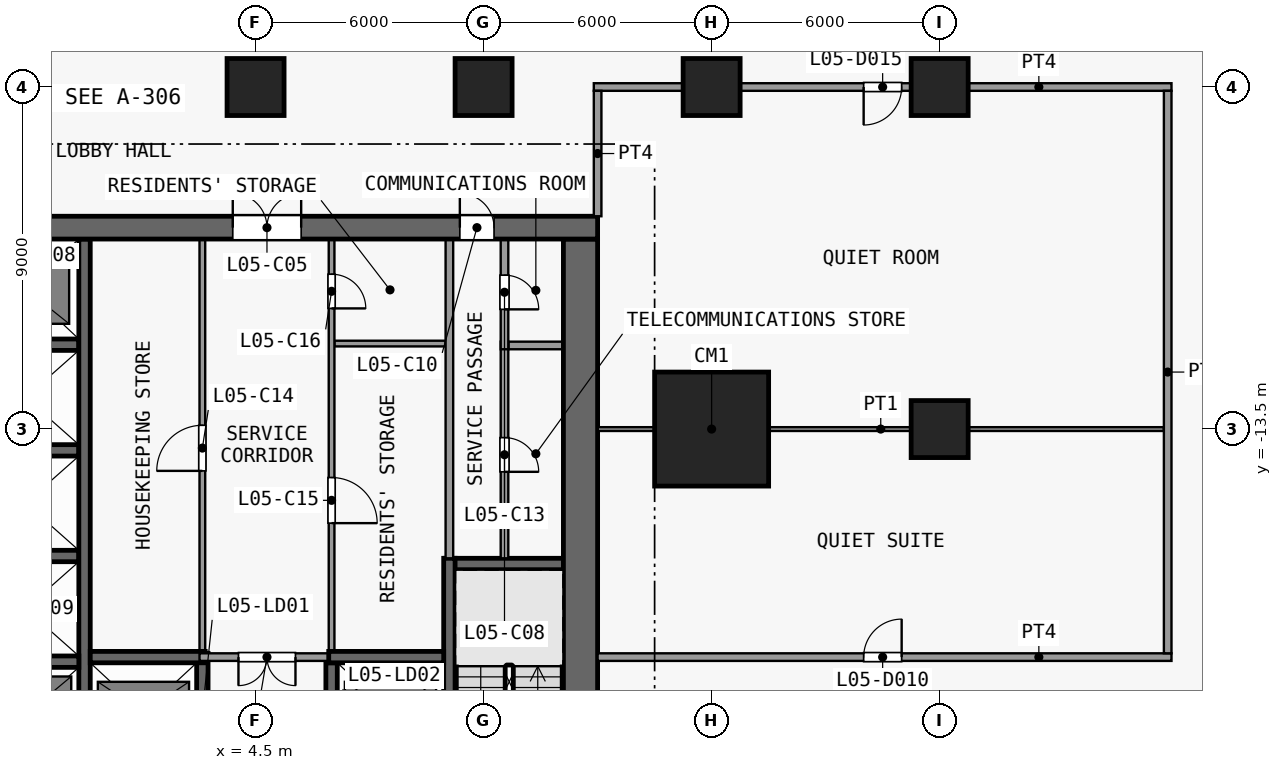
"""IFC4 building model, lengths in metres.
Left out: names, types, materials, properties, quantities, classifications, styles, units other than length and angle.
Written with IfcOpenShell. Run it as: python <this file> out.ifc"""

import sys

from ifc_helpers import new_model, si_unit, direction, frame, frame_2d, origin, origin_2d, place, context, subcontext, project, spatial, rectangle, extrude, element, fill, save


model = new_model("IFC4")
c1 = context("Model", 3, precision=1e-05, world=origin(), true_north=direction((0.0, 1.0)))
c2 = subcontext(c1, "Body", "Model", "MODEL_VIEW")
j1 = project(units=[si_unit("LENGTHUNIT", "METRE"), si_unit("PLANEANGLEUNIT", "RADIAN")], contexts=[c1])
p1 = place(None, origin())
s1 = spatial("IfcSite", under=j1, at=p1, CompositionType="ELEMENT")
p2 = place(p1, origin())
s2 = spatial("IfcBuilding", under=s1, at=p2, CompositionType="ELEMENT")
p3 = place(p2, frame((0.0, 0.0, 28.0)))
s3 = spatial("IfcBuildingStorey", under=s2, at=p3, CompositionType="ELEMENT", Elevation=28.0)
for number, where, z_axis, x_axis in (
    (1, (4.5, -4.5, 0.0), (0.0, 0.0, 1.0), (1.0, 0.0, 0.0)),
    (2, (10.5, -4.5, 0.0), (0.0, 0.0, 1.0), (1.0, 0.0, 0.0)),
):
    element("IfcColumn", number, at=place(p3, frame(where, z_axis=z_axis, x_axis=x_axis)), inside=s3, PredefinedType="COLUMN", context=c2, shape_type="SweptSolid", body=[
        extrude(rectangle(XDim=1.5, YDim=1.5, at=origin_2d()), origin(), (0.0, 0.0, 1.0), 4.5),
    ])
p4 = place(p3, frame((16.5, -13.5, 0.0), z_axis=(0.0, 0.0, 1.0), x_axis=(1.0, 0.0, 0.0)))
e3 = element("IfcColumn", 3, at=p4, inside=s3, PredefinedType="COLUMN", context=c2, shape_type="SweptSolid", body=[
    extrude(rectangle(XDim=3.0, YDim=3.0, at=origin_2d()), origin(), (0.0, 0.0, 1.0), 4.5),
])
for number, where, z_axis, x_axis in (
    (4, (16.5, -4.5, 0.0), (0.0, 0.0, 1.0), (1.0, 0.0, 0.0)),
    (5, (22.5, -13.5, 0.0), (0.0, 0.0, 1.0), (1.0, 0.0, 0.0)),
    (6, (22.5, -4.5, 0.0), (0.0, 0.0, 1.0), (1.0, 0.0, 0.0)),
):
    element("IfcColumn", number, at=place(p3, frame(where, z_axis=z_axis, x_axis=x_axis)), inside=s3, PredefinedType="COLUMN", context=c2, shape_type="SweptSolid", body=[
        extrude(rectangle(XDim=1.5, YDim=1.5, at=origin_2d()), origin(), (0.0, 0.0, 1.0), 4.5),
    ])
p5 = place(p3, frame((-13.5, -8.2, 0.0), z_axis=(0.0, 0.0, 1.0), x_axis=(1.0, 0.0, 0.0)))
e7 = element("IfcWall", 7, at=p5, inside=s3, PredefinedType="SHEAR", context=c2, shape_type="SweptSolid", body=[
    extrude(rectangle(XDim=27.0, YDim=0.6, at=frame_2d((13.5, 0.0))), origin(), (0.0, 0.0, 1.0), 4.1),
])
p6 = place(p5, frame((7.8, 0.0, 0.0)))
e8 = element("IfcOpeningElement", 8, at=p6, cuts=e7, PredefinedType="OPENING", context=c2, shape_type="SweptSolid", body=[
    extrude(rectangle(XDim=1.8, YDim=2.1, at=frame_2d((0.9, 1.05))), frame((0.0, 0.31, 0.0), z_axis=(0.0, -1.0, 0.0), x_axis=(1.0, 0.0, 0.0)), (0.0, 0.0, 1.0), 0.62),
])
p7 = place(p5, frame((17.4, 0.0, 0.0)))
e9 = element("IfcOpeningElement", 9, at=p7, cuts=e7, PredefinedType="OPENING", context=c2, shape_type="SweptSolid", body=[
    extrude(rectangle(XDim=1.8, YDim=2.1, at=frame_2d((0.9, 1.05))), frame((0.0, 0.31, 0.0), z_axis=(0.0, -1.0, 0.0), x_axis=(1.0, 0.0, 0.0)), (0.0, 0.0, 1.0), 0.62),
])
p8 = place(p5, frame((2.725, 0.0, 0.0)))
e10 = element("IfcOpeningElement", 10, at=p8, cuts=e7, PredefinedType="OPENING", context=c2, shape_type="SweptSolid", body=[
    extrude(rectangle(XDim=0.9, YDim=2.1, at=frame_2d((0.45, 1.05))), frame((0.0, 0.31, 0.0), z_axis=(0.0, -1.0, 0.0), x_axis=(1.0, 0.0, 0.0)), (0.0, 0.0, 1.0), 0.62),
])
p9 = place(p5, frame((23.375, 0.0, 0.0)))
e11 = element("IfcOpeningElement", 11, at=p9, cuts=e7, PredefinedType="OPENING", context=c2, shape_type="SweptSolid", body=[
    extrude(rectangle(XDim=0.9, YDim=2.1, at=frame_2d((0.45, 1.05))), frame((0.0, 0.31, 0.0), z_axis=(0.0, -1.0, 0.0), x_axis=(1.0, 0.0, 0.0)), (0.0, 0.0, 1.0), 0.62),
])
p10 = place(p3, frame((13.05, -24.6, 0.0), z_axis=(0.0, 0.0, 1.0), x_axis=(0.0, 1.0, 0.0)))
e12 = element("IfcWall", 12, at=p10, inside=s3, PredefinedType="SHEAR", context=c2, shape_type="SweptSolid", body=[
    extrude(rectangle(XDim=16.1, YDim=0.9, at=frame_2d((8.05, 0.0))), origin(), (0.0, 0.0, 1.0), 4.1),
])
p11 = place(p10, frame((0.2, 0.0, 0.0)))
e13 = element("IfcOpeningElement", 13, at=p11, cuts=e12, PredefinedType="OPENING", context=c2, shape_type="SweptSolid", body=[
    extrude(rectangle(XDim=1.1, YDim=2.1, at=frame_2d((0.55, 1.05))), frame((0.0, 0.46, 0.0), z_axis=(0.0, -1.0, 0.0), x_axis=(1.0, 0.0, 0.0)), (0.0, 0.0, 1.0), 0.92),
])
p12 = place(p3, frame((-2.95, -19.62, 0.0), z_axis=(0.0, 0.0, 1.0), x_axis=(1.0, 0.0, 0.0)))
e14 = element("IfcWall", 14, at=p12, inside=s3, PredefinedType="SHEAR", context=c2, shape_type="SweptSolid", body=[
    extrude(rectangle(XDim=2.8, YDim=0.3, at=frame_2d((1.4, 0.0))), origin(), (0.0, 0.0, 1.0), 4.1),
])
p13 = place(p3, frame((0.15, -19.5, 0.0), z_axis=(0.0, 0.0, 1.0), x_axis=(1.0, 0.0, 0.0)))
e15 = element("IfcWall", 15, at=p13, inside=s3, PredefinedType="SHEAR", context=c2, shape_type="SweptSolid", body=[
    extrude(rectangle(XDim=3.025, YDim=0.3, at=frame_2d((1.513, 0.0))), origin(), (0.0, 0.0, 1.0), 4.1),
])
p14 = place(p3, frame((6.575, -19.5, 0.0), z_axis=(0.0, 0.0, 1.0), x_axis=(-1.0, 0.0, 0.0)))
e16 = element("IfcWall", 16, at=p14, inside=s3, PredefinedType="PARTITIONING", context=c2, shape_type="SweptSolid", body=[
    extrude(rectangle(XDim=3.55, YDim=0.2, at=frame_2d((1.775, 0.0))), origin(), (0.0, 0.0, 1.0), 4.1),
])
p15 = place(p14, frame((1.025, 0.0, 0.0)))
e17 = element("IfcOpeningElement", 17, at=p15, cuts=e16, PredefinedType="OPENING", context=c2, shape_type="SweptSolid", body=[
    extrude(rectangle(XDim=1.5, YDim=2.1, at=frame_2d((0.75, 1.05))), frame((0.0, 0.11, 0.0), z_axis=(0.0, -1.0, 0.0), x_axis=(1.0, 0.0, 0.0)), (0.0, 0.0, 1.0), 0.22),
])
p16 = place(p3, frame((6.425, -19.5, 0.0), z_axis=(0.0, 0.0, 1.0), x_axis=(1.0, 0.0, 0.0)))
e18 = element("IfcWall", 18, at=p16, inside=s3, PredefinedType="SHEAR", context=c2, shape_type="SweptSolid", body=[
    extrude(rectangle(XDim=3.025, YDim=0.3, at=frame_2d((1.512, 0.0))), origin(), (0.0, 0.0, 1.0), 4.1),
])
p17 = place(p3, frame((9.5, -17.05, 0.0), z_axis=(0.0, 0.0, 1.0), x_axis=(1.0, 0.0, 0.0)))
e19 = element("IfcWall", 19, at=p17, inside=s3, PredefinedType="SHEAR", context=c2, shape_type="SweptSolid", body=[
    extrude(rectangle(XDim=3.1, YDim=0.3, at=frame_2d((1.55, 0.0))), origin(), (0.0, 0.0, 1.0), 4.1),
])
for number, where, z_axis, x_axis in (
    (20, (-2.95, -16.84, 0.0), (0.0, 0.0, 1.0), (1.0, 0.0, 0.0)),
    (21, (-2.95, -14.06, 0.0), (0.0, 0.0, 1.0), (1.0, 0.0, 0.0)),
):
    element("IfcWall", number, at=place(p3, frame(where, z_axis=z_axis, x_axis=x_axis)), inside=s3, PredefinedType="SHEAR", context=c2, shape_type="SweptSolid", body=[
        extrude(rectangle(XDim=2.8, YDim=0.3, at=frame_2d((1.4, 0.0))), origin(), (0.0, 0.0, 1.0), 4.1),
    ])
p18 = place(p3, frame((11.15, -11.3, 0.0), z_axis=(0.0, 0.0, 1.0), x_axis=(1.0, 0.0, 0.0)))
e22 = element("IfcWall", 22, at=p18, inside=s3, PredefinedType="PARTITIONING", context=c2, shape_type="SweptSolid", body=[
    extrude(rectangle(XDim=1.45, YDim=0.2, at=frame_2d((0.725, 0.0))), origin(), (0.0, 0.0, 1.0), 4.1),
])
p19 = place(p3, frame((-2.95, -11.28, 0.0), z_axis=(0.0, 0.0, 1.0), x_axis=(1.0, 0.0, 0.0)))
e23 = element("IfcWall", 23, at=p19, inside=s3, PredefinedType="SHEAR", context=c2, shape_type="SweptSolid", body=[
    extrude(rectangle(XDim=2.8, YDim=0.3, at=frame_2d((1.4, 0.0))), origin(), (0.0, 0.0, 1.0), 4.1),
])
p20 = place(p3, frame((6.575, -11.25, 0.0), z_axis=(0.0, 0.0, 1.0), x_axis=(1.0, 0.0, 0.0)))
e24 = element("IfcWall", 24, at=p20, inside=s3, PredefinedType="PARTITIONING", context=c2, shape_type="SweptSolid", body=[
    extrude(rectangle(XDim=2.925, YDim=0.15, at=frame_2d((1.462, 0.0))), origin(), (0.0, 0.0, 1.0), 4.1),
])
p21 = place(p3, frame((0.0, -22.25, 0.0), z_axis=(0.0, 0.0, 1.0), x_axis=(0.0, 1.0, 0.0)))
e25 = element("IfcWall", 25, at=p21, inside=s3, PredefinedType="SHEAR", context=c2, shape_type="SweptSolid", body=[
    extrude(rectangle(XDim=13.75, YDim=0.3, at=frame_2d((6.875, 0.0))), origin(), (0.0, 0.0, 1.0), 4.1),
])
p22 = place(p3, frame((3.1, -22.25, 0.0), z_axis=(0.0, 0.0, 1.0), x_axis=(0.0, 1.0, 0.0)))
e26 = element("IfcWall", 26, at=p22, inside=s3, PredefinedType="SHEAR", context=c2, shape_type="SweptSolid", body=[
    extrude(rectangle(XDim=2.85, YDim=0.3, at=frame_2d((1.425, 0.0))), origin(), (0.0, 0.0, 1.0), 4.1),
])
p23 = place(p22, frame((0.75, 0.0, 0.0)))
e27 = element("IfcOpeningElement", 27, at=p23, cuts=e26, PredefinedType="OPENING", context=c2, shape_type="SweptSolid", body=[
    extrude(rectangle(XDim=1.1, YDim=2.1, at=frame_2d((0.55, 1.05))), frame((0.0, 0.16, 0.0), z_axis=(0.0, -1.0, 0.0), x_axis=(1.0, 0.0, 0.0)), (0.0, 0.0, 1.0), 0.32),
])
p24 = place(p3, frame((3.1, -19.4, 0.0), z_axis=(0.0, 0.0, 1.0), x_axis=(0.0, 1.0, 0.0)))
e28 = element("IfcWall", 28, at=p24, inside=s3, PredefinedType="PARTITIONING", context=c2, shape_type="SweptSolid", body=[
    extrude(rectangle(XDim=10.9, YDim=0.15, at=frame_2d((5.45, 0.0))), origin(), (0.0, 0.0, 1.0), 4.1),
])
p25 = place(p24, frame((4.8, 0.0, 0.0)))
e29 = element("IfcOpeningElement", 29, at=p25, cuts=e28, PredefinedType="OPENING", context=c2, shape_type="SweptSolid", body=[
    extrude(rectangle(XDim=1.2, YDim=2.1, at=frame_2d((0.6, 1.05))), frame((0.0, 0.085, 0.0), z_axis=(0.0, -1.0, 0.0), x_axis=(1.0, 0.0, 0.0)), (0.0, 0.0, 1.0), 0.17),
])
p26 = place(p3, frame((6.5, -22.25, 0.0), z_axis=(0.0, 0.0, 1.0), x_axis=(0.0, 1.0, 0.0)))
e30 = element("IfcWall", 30, at=p26, inside=s3, PredefinedType="SHEAR", context=c2, shape_type="SweptSolid", body=[
    extrude(rectangle(XDim=2.6, YDim=0.3, at=frame_2d((1.3, 0.0))), origin(), (0.0, 0.0, 1.0), 4.1),
])
p27 = place(p26, frame((0.75, 0.0, 0.0)))
e31 = element("IfcOpeningElement", 31, at=p27, cuts=e30, PredefinedType="OPENING", context=c2, shape_type="SweptSolid", body=[
    extrude(rectangle(XDim=1.1, YDim=2.1, at=frame_2d((0.55, 1.05))), frame((0.0, 0.16, 0.0), z_axis=(0.0, -1.0, 0.0), x_axis=(1.0, 0.0, 0.0)), (0.0, 0.0, 1.0), 0.32),
])
p28 = place(p3, frame((6.5, -8.5, 0.0), z_axis=(0.0, 0.0, 1.0), x_axis=(0.0, -1.0, 0.0)))
e32 = element("IfcWall", 32, at=p28, inside=s3, PredefinedType="PARTITIONING", context=c2, shape_type="SweptSolid", body=[
    extrude(rectangle(XDim=10.85, YDim=0.15, at=frame_2d((5.425, 0.0))), origin(), (0.0, 0.0, 1.0), 4.1),
])
p29 = place(p28, frame((6.275, 0.0, 0.0)))
e33 = element("IfcOpeningElement", 33, at=p29, cuts=e32, PredefinedType="OPENING", context=c2, shape_type="SweptSolid", body=[
    extrude(rectangle(XDim=1.2, YDim=2.1, at=frame_2d((0.6, 1.05))), frame((0.0, 0.085, 0.0), z_axis=(0.0, -1.0, 0.0), x_axis=(1.0, 0.0, 0.0)), (0.0, 0.0, 1.0), 0.17),
])
p30 = place(p28, frame((0.925, 0.0, 0.0)))
e34 = element("IfcOpeningElement", 34, at=p30, cuts=e32, PredefinedType="OPENING", context=c2, shape_type="SweptSolid", body=[
    extrude(rectangle(XDim=0.9, YDim=2.1, at=frame_2d((0.45, 1.05))), frame((0.0, 0.085, 0.0), z_axis=(0.0, -1.0, 0.0), x_axis=(1.0, 0.0, 0.0)), (0.0, 0.0, 1.0), 0.17),
])
p31 = place(p3, frame((9.6, -16.9, 0.0), z_axis=(0.0, 0.0, 1.0), x_axis=(0.0, -1.0, 0.0)))
e35 = element("IfcWall", 35, at=p31, inside=s3, PredefinedType="SHEAR", context=c2, shape_type="SweptSolid", body=[
    extrude(rectangle(XDim=7.7, YDim=0.3, at=frame_2d((3.85, 0.0))), origin(), (0.0, 0.0, 1.0), 4.1),
])
p32 = place(p31, frame((6.5, 0.0, 0.0)))
e36 = element("IfcOpeningElement", 36, at=p32, cuts=e35, PredefinedType="OPENING", context=c2, shape_type="SweptSolid", body=[
    extrude(rectangle(XDim=1.1, YDim=2.1, at=frame_2d((0.55, 1.05))), frame((0.0, 0.16, 0.0), z_axis=(0.0, -1.0, 0.0), x_axis=(1.0, 0.0, 0.0)), (0.0, 0.0, 1.0), 0.32),
])
p33 = place(p3, frame((9.6, -16.9, 0.0), z_axis=(0.0, 0.0, 1.0), x_axis=(0.0, 1.0, 0.0)))
e37 = element("IfcWall", 37, at=p33, inside=s3, PredefinedType="PARTITIONING", context=c2, shape_type="SweptSolid", body=[
    extrude(rectangle(XDim=8.4, YDim=0.2, at=frame_2d((4.2, 0.0))), origin(), (0.0, 0.0, 1.0), 4.1),
])
p34 = place(p3, frame((11.05, -11.2, 0.0), z_axis=(0.0, 0.0, 1.0), x_axis=(0.0, -1.0, 0.0)))
e38 = element("IfcWall", 38, at=p34, inside=s3, PredefinedType="PARTITIONING", context=c2, shape_type="SweptSolid", body=[
    extrude(rectangle(XDim=5.7, YDim=0.2, at=frame_2d((2.85, 0.0))), origin(), (0.0, 0.0, 1.0), 4.1),
])
p35 = place(p34, frame((2.525, 0.0, 0.0)))
e39 = element("IfcOpeningElement", 39, at=p35, cuts=e38, PredefinedType="OPENING", context=c2, shape_type="SweptSolid", body=[
    extrude(rectangle(XDim=0.9, YDim=2.1, at=frame_2d((0.45, 1.05))), frame((0.0, 0.11, 0.0), z_axis=(0.0, -1.0, 0.0), x_axis=(1.0, 0.0, 0.0)), (0.0, 0.0, 1.0), 0.22),
])
p36 = place(p3, frame((11.05, -8.5, 0.0), z_axis=(0.0, 0.0, 1.0), x_axis=(0.0, -1.0, 0.0)))
e40 = element("IfcWall", 40, at=p36, inside=s3, PredefinedType="PARTITIONING", context=c2, shape_type="SweptSolid", body=[
    extrude(rectangle(XDim=2.9, YDim=0.2, at=frame_2d((1.45, 0.0))), origin(), (0.0, 0.0, 1.0), 4.1),
])
p37 = place(p36, frame((0.95, 0.0, 0.0)))
e41 = element("IfcOpeningElement", 41, at=p37, cuts=e40, PredefinedType="OPENING", context=c2, shape_type="SweptSolid", body=[
    extrude(rectangle(XDim=0.9, YDim=2.1, at=frame_2d((0.45, 1.05))), frame((0.0, 0.11, 0.0), z_axis=(0.0, -1.0, 0.0), x_axis=(1.0, 0.0, 0.0)), (0.0, 0.0, 1.0), 0.22),
])
p38 = place(p3, frame((13.5, -19.5, 0.0), z_axis=(0.0, 0.0, 1.0), x_axis=(1.0, 0.0, 0.0)))
e42 = element("IfcWall", 42, at=p38, inside=s3, PredefinedType="PARTITIONING", context=c2, shape_type="SweptSolid", body=[
    extrude(rectangle(XDim=15.1, YDim=0.2, at=frame_2d((7.55, 0.0))), origin(), (0.0, 0.0, 1.0), 4.1),
])
p39 = place(p38, frame((7.0, 0.0, 0.0)))
e43 = element("IfcOpeningElement", 43, at=p39, cuts=e42, PredefinedType="OPENING", context=c2, shape_type="SweptSolid", body=[
    extrude(rectangle(XDim=1.0, YDim=2.1, at=frame_2d((0.5, 1.05))), frame((0.0, 0.11, 0.0), z_axis=(0.0, -1.0, 0.0), x_axis=(1.0, 0.0, 0.0)), (0.0, 0.0, 1.0), 0.22),
])
p40 = place(p3, frame((13.5, -13.5, 0.0), z_axis=(0.0, 0.0, 1.0), x_axis=(1.0, 0.0, 0.0)))
e44 = element("IfcWall", 44, at=p40, inside=s3, PredefinedType="PARTITIONING", context=c2, shape_type="SweptSolid", body=[
    extrude(rectangle(XDim=14.9, YDim=0.1, at=frame_2d((7.45, 0.0))), origin(), (0.0, 0.0, 1.0), 4.1),
])
p41 = place(p3, frame((13.4, -4.5, 0.0), z_axis=(0.0, 0.0, 1.0), x_axis=(1.0, 0.0, 0.0)))
e45 = element("IfcWall", 45, at=p41, inside=s3, PredefinedType="PARTITIONING", context=c2, shape_type="SweptSolid", body=[
    extrude(rectangle(XDim=15.2, YDim=0.2, at=frame_2d((7.6, 0.0))), origin(), (0.0, 0.0, 1.0), 4.1),
])
p42 = place(p41, frame((7.1, 0.0, 0.0)))
e46 = element("IfcOpeningElement", 46, at=p42, cuts=e45, PredefinedType="OPENING", context=c2, shape_type="SweptSolid", body=[
    extrude(rectangle(XDim=1.0, YDim=2.1, at=frame_2d((0.5, 1.05))), frame((0.0, 0.11, 0.0), z_axis=(0.0, -1.0, 0.0), x_axis=(1.0, 0.0, 0.0)), (0.0, 0.0, 1.0), 0.22),
])
p43 = place(p3, frame((13.5, -7.9, 0.0), z_axis=(0.0, 0.0, 1.0), x_axis=(0.0, 1.0, 0.0)))
e47 = element("IfcWall", 47, at=p43, inside=s3, PredefinedType="PARTITIONING", context=c2, shape_type="SweptSolid", body=[
    extrude(rectangle(XDim=3.3, YDim=0.2, at=frame_2d((1.65, 0.0))), origin(), (0.0, 0.0, 1.0), 4.1),
])
p44 = place(p3, frame((28.5, -19.4, 0.0), z_axis=(0.0, 0.0, 1.0), x_axis=(0.0, 1.0, 0.0)))
e48 = element("IfcWall", 48, at=p44, inside=s3, PredefinedType="PARTITIONING", context=c2, shape_type="SweptSolid", body=[
    extrude(rectangle(XDim=14.8, YDim=0.2, at=frame_2d((7.4, 0.0))), origin(), (0.0, 0.0, 1.0), 4.1),
])
p45 = place(p15, origin())
e49 = element("IfcDoor", 49, at=p45, inside=s3, OperationType="DOUBLE_DOOR_SINGLE_SWING", PredefinedType="DOOR", context=c2, shape_type="SweptSolid", body=[
    extrude(rectangle(XDim=1.5, YDim=2.1, at=frame_2d((0.75, 1.05))), frame((0.0, 0.025, 0.0), z_axis=(0.0, -1.0, 0.0), x_axis=(1.0, 0.0, 0.0)), (0.0, 0.0, 1.0), 0.05),
])
fill(e17, e49)
p46 = place(p7, origin())
e50 = element("IfcDoor", 50, at=p46, inside=s3, OperationType="DOUBLE_DOOR_SINGLE_SWING", PredefinedType="DOOR", context=c2, shape_type="SweptSolid", body=[
    extrude(rectangle(XDim=1.8, YDim=2.1, at=frame_2d((0.9, 1.05))), frame((0.0, 0.025, 0.0), z_axis=(0.0, -1.0, 0.0), x_axis=(1.0, 0.0, 0.0)), (0.0, 0.0, 1.0), 0.05),
])
fill(e9, e50)
p47 = place(p37, origin())
e51 = element("IfcDoor", 51, at=p47, inside=s3, OperationType="SINGLE_SWING_RIGHT", PredefinedType="DOOR", context=c2, shape_type="SweptSolid", body=[
    extrude(rectangle(XDim=0.9, YDim=2.1, at=frame_2d((0.45, 1.05))), frame((0.0, 0.025, 0.0), z_axis=(0.0, -1.0, 0.0), x_axis=(1.0, 0.0, 0.0)), (0.0, 0.0, 1.0), 0.05),
])
fill(e41, e51)
p48 = place(p9, origin())
e52 = element("IfcDoor", 52, at=p48, inside=s3, OperationType="SINGLE_SWING_LEFT", PredefinedType="DOOR", context=c2, shape_type="SweptSolid", body=[
    extrude(rectangle(XDim=0.9, YDim=2.1, at=frame_2d((0.45, 1.05))), frame((0.0, 0.025, 0.0), z_axis=(0.0, -1.0, 0.0), x_axis=(1.0, 0.0, 0.0)), (0.0, 0.0, 1.0), 0.05),
])
fill(e11, e52)
p49 = place(p35, origin())
e53 = element("IfcDoor", 53, at=p49, inside=s3, OperationType="SINGLE_SWING_RIGHT", PredefinedType="DOOR", context=c2, shape_type="SweptSolid", body=[
    extrude(rectangle(XDim=0.9, YDim=2.1, at=frame_2d((0.45, 1.05))), frame((0.0, 0.025, 0.0), z_axis=(0.0, -1.0, 0.0), x_axis=(1.0, 0.0, 0.0)), (0.0, 0.0, 1.0), 0.05),
])
fill(e39, e53)
p50 = place(p25, origin())
e54 = element("IfcDoor", 54, at=p50, inside=s3, OperationType="SINGLE_SWING_LEFT", PredefinedType="DOOR", context=c2, shape_type="SweptSolid", body=[
    extrude(rectangle(XDim=1.2, YDim=2.1, at=frame_2d((0.6, 1.05))), frame((0.0, 0.025, 0.0), z_axis=(0.0, -1.0, 0.0), x_axis=(1.0, 0.0, 0.0)), (0.0, 0.0, 1.0), 0.05),
])
fill(e29, e54)
p51 = place(p29, origin())
e55 = element("IfcDoor", 55, at=p51, inside=s3, OperationType="SINGLE_SWING_RIGHT", PredefinedType="DOOR", context=c2, shape_type="SweptSolid", body=[
    extrude(rectangle(XDim=1.2, YDim=2.1, at=frame_2d((0.6, 1.05))), frame((0.0, 0.025, 0.0), z_axis=(0.0, -1.0, 0.0), x_axis=(1.0, 0.0, 0.0)), (0.0, 0.0, 1.0), 0.05),
])
fill(e33, e55)
p52 = place(p30, origin())
e56 = element("IfcDoor", 56, at=p52, inside=s3, OperationType="SINGLE_SWING_RIGHT", PredefinedType="DOOR", context=c2, shape_type="SweptSolid", body=[
    extrude(rectangle(XDim=0.9, YDim=2.1, at=frame_2d((0.45, 1.05))), frame((0.0, 0.025, 0.0), z_axis=(0.0, -1.0, 0.0), x_axis=(1.0, 0.0, 0.0)), (0.0, 0.0, 1.0), 0.05),
])
fill(e34, e56)
p53 = place(p39, origin())
e57 = element("IfcDoor", 57, at=p53, inside=s3, OperationType="SINGLE_SWING_LEFT", PredefinedType="DOOR", context=c2, shape_type="SweptSolid", body=[
    extrude(rectangle(XDim=1.0, YDim=2.1, at=frame_2d((0.5, 1.05))), frame((0.0, 0.025, 0.0), z_axis=(0.0, -1.0, 0.0), x_axis=(1.0, 0.0, 0.0)), (0.0, 0.0, 1.0), 0.05),
])
fill(e43, e57)
p54 = place(p42, origin())
e58 = element("IfcDoor", 58, at=p54, inside=s3, OperationType="SINGLE_SWING_LEFT", PredefinedType="DOOR", context=c2, shape_type="SweptSolid", body=[
    extrude(rectangle(XDim=1.0, YDim=2.1, at=frame_2d((0.5, 1.05))), frame((0.0, 0.025, 0.0), z_axis=(0.0, -1.0, 0.0), x_axis=(1.0, 0.0, 0.0)), (0.0, 0.0, 1.0), 0.05),
])
fill(e46, e58)
save(model, sys.argv[1])
